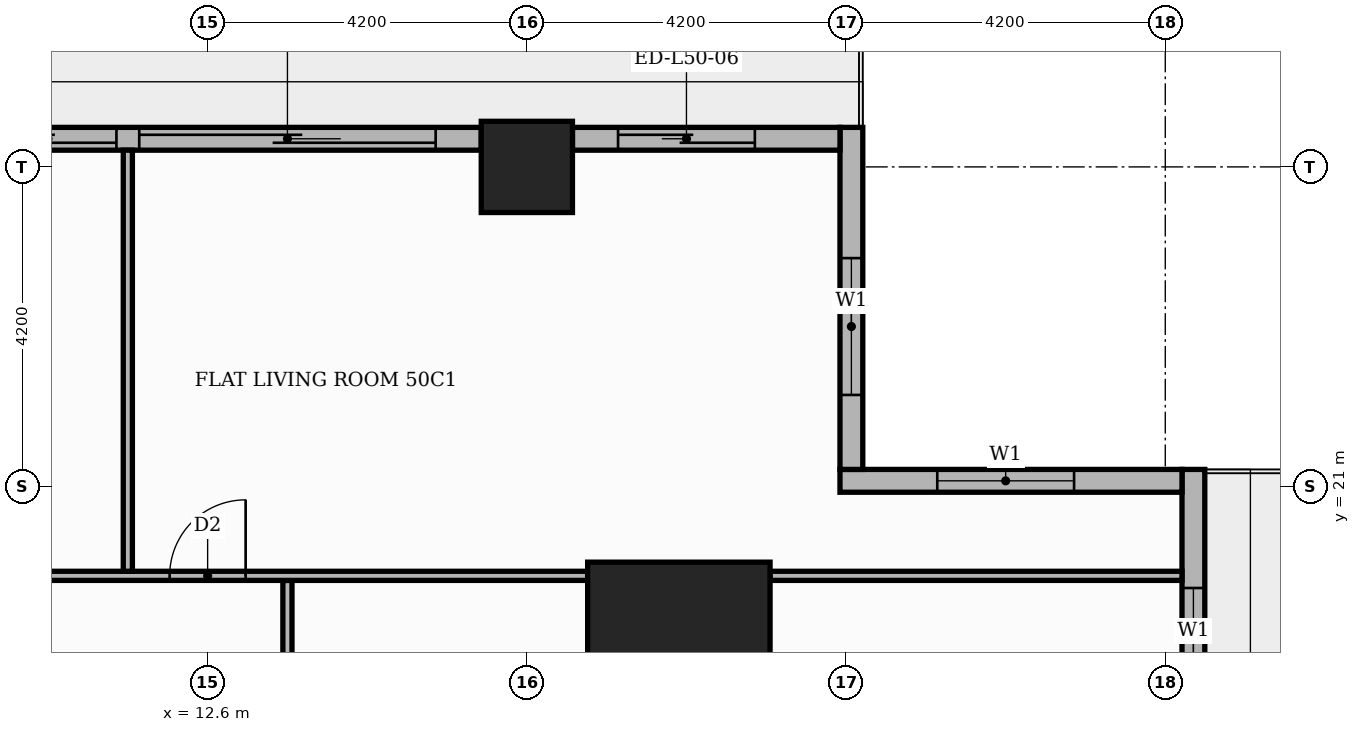
"""IFC4 building model, lengths in metres.
Left out: names, types, materials, properties, quantities, classifications, styles, units other than length and angle.
Written with IfcOpenShell. Run it as: python <this file> out.ifc"""

import sys

from ifc_helpers import new_model, si_unit, direction, frame, frame_2d, origin, origin_2d, place, context, subcontext, project, spatial, rectangle, extrude, element, fill, save


model = new_model("IFC4")
c1 = context("Model", 3, precision=1e-05, world=origin(), true_north=direction((0.0, 1.0)))
c2 = subcontext(c1, "Body", "Model", "MODEL_VIEW")
j1 = project(units=[si_unit("LENGTHUNIT", "METRE"), si_unit("PLANEANGLEUNIT", "RADIAN")], contexts=[c1])
p1 = place(None, origin())
s1 = spatial("IfcSite", under=j1, at=p1, CompositionType="ELEMENT")
p2 = place(p1, origin())
s2 = spatial("IfcBuilding", under=s1, at=p2, CompositionType="ELEMENT")
p3 = place(p2, frame((0.0, 0.0, 211.8)))
s3 = spatial("IfcBuildingStorey", under=s2, at=p3, CompositionType="ELEMENT", Elevation=211.8)
p4 = place(p3, frame((18.8, 18.8, 0.0), z_axis=(0.0, 0.0, 1.0), x_axis=(1.0, 0.0, 0.0)))
e1 = element("IfcColumn", 1, at=p4, inside=s3, PredefinedType="COLUMN", context=c2, shape_type="SweptSolid", body=[
    extrude(rectangle(XDim=2.4, YDim=2.4, at=origin_2d()), origin(), (0.0, 0.0, 1.0), 3.9),
])
p5 = place(p3, frame((16.8, 25.2, 0.0), z_axis=(0.0, 0.0, 1.0), x_axis=(1.0, 0.0, 0.0)))
e2 = element("IfcColumn", 2, at=p5, inside=s3, PredefinedType="COLUMN", context=c2, shape_type="SweptSolid", body=[
    extrude(rectangle(XDim=1.2, YDim=1.2, at=origin_2d()), origin(), (0.0, 0.0, 1.0), 3.9),
])
p6 = place(p3, frame((25.57, 17.4, 0.0), z_axis=(0.0, 0.0, 1.0), x_axis=(0.0, 1.0, 0.0)))
e3 = element("IfcWall", 3, at=p6, inside=s3, PredefinedType="STANDARD", context=c2, shape_type="SweptSolid", body=[
    extrude(rectangle(XDim=3.82, YDim=0.3, at=frame_2d((1.91, 0.0))), origin(), (0.0, 0.0, 1.0), 3.48),
])
p7 = place(p6, frame((0.46, 0.0, 0.9)))
e4 = element("IfcOpeningElement", 4, at=p7, cuts=e3, PredefinedType="OPENING", context=c2, shape_type="SweptSolid", body=[
    extrude(rectangle(XDim=1.8, YDim=2.1, at=frame_2d((0.9, 1.05))), frame((0.0, 0.16, 0.0), z_axis=(0.0, -1.0, 0.0), x_axis=(1.0, 0.0, 0.0)), (0.0, 0.0, 1.0), 0.32),
])
p8 = place(p3, frame((25.42, 21.07, 0.0), z_axis=(0.0, 0.0, 1.0), x_axis=(-1.0, 0.0, 0.0)))
e5 = element("IfcWall", 5, at=p8, inside=s3, PredefinedType="STANDARD", context=c2, shape_type="SweptSolid", body=[
    extrude(rectangle(XDim=4.5, YDim=0.3, at=frame_2d((2.25, 0.0))), origin(), (0.0, 0.0, 1.0), 3.48),
])
p9 = place(p8, frame((1.42, 0.0, 0.9)))
e6 = element("IfcOpeningElement", 6, at=p9, cuts=e5, PredefinedType="OPENING", context=c2, shape_type="SweptSolid", body=[
    extrude(rectangle(XDim=1.8, YDim=2.1, at=frame_2d((0.9, 1.05))), frame((0.0, 0.16, 0.0), z_axis=(0.0, -1.0, 0.0), x_axis=(1.0, 0.0, 0.0)), (0.0, 0.0, 1.0), 0.32),
])
p10 = place(p3, frame((21.07, 21.22, 0.0), z_axis=(0.0, 0.0, 1.0), x_axis=(0.0, 1.0, 0.0)))
e7 = element("IfcWall", 7, at=p10, inside=s3, PredefinedType="STANDARD", context=c2, shape_type="SweptSolid", body=[
    extrude(rectangle(XDim=4.5, YDim=0.3, at=frame_2d((2.25, 0.0))), origin(), (0.0, 0.0, 1.0), 3.48),
])
p11 = place(p10, frame((0.98, 0.0, 0.9)))
e8 = element("IfcOpeningElement", 8, at=p11, cuts=e7, PredefinedType="OPENING", context=c2, shape_type="SweptSolid", body=[
    extrude(rectangle(XDim=1.8, YDim=2.1, at=frame_2d((0.9, 1.05))), frame((0.0, 0.16, 0.0), z_axis=(0.0, -1.0, 0.0), x_axis=(1.0, 0.0, 0.0)), (0.0, 0.0, 1.0), 0.32),
])
p12 = place(p3, frame((20.92, 25.57, 0.0), z_axis=(0.0, 0.0, 1.0), x_axis=(-1.0, 0.0, 0.0)))
e9 = element("IfcWall", 9, at=p12, inside=s3, PredefinedType="STANDARD", context=c2, shape_type="SweptSolid", body=[
    extrude(rectangle(XDim=3.52, YDim=0.3, at=frame_2d((1.76, 0.0))), origin(), (0.0, 0.0, 1.0), 3.48),
])
p13 = place(p12, frame((1.12, 0.0, 0.0)))
e10 = element("IfcOpeningElement", 10, at=p13, cuts=e9, PredefinedType="OPENING", context=c2, shape_type="SweptSolid", body=[
    extrude(rectangle(XDim=1.8, YDim=2.4, at=frame_2d((0.9, 1.2))), frame((0.0, 0.16, 0.0), z_axis=(0.0, -1.0, 0.0), x_axis=(1.0, 0.0, 0.0)), (0.0, 0.0, 1.0), 0.32),
])
p14 = place(p3, frame((16.2, 25.57, 0.0), z_axis=(0.0, 0.0, 1.0), x_axis=(-1.0, 0.0, 0.0)))
e11 = element("IfcWall", 11, at=p14, inside=s3, PredefinedType="STANDARD", context=c2, shape_type="SweptSolid", body=[
    extrude(rectangle(XDim=7.2, YDim=0.3, at=frame_2d((3.6, 0.0))), origin(), (0.0, 0.0, 1.0), 3.48),
])
p15 = place(p14, frame((0.6, 0.0, 0.0)))
e12 = element("IfcOpeningElement", 12, at=p15, cuts=e11, PredefinedType="OPENING", context=c2, shape_type="SweptSolid", body=[
    extrude(rectangle(XDim=3.9, YDim=2.4, at=frame_2d((1.95, 1.2))), frame((0.0, 0.16, 0.0), z_axis=(0.0, -1.0, 0.0), x_axis=(1.0, 0.0, 0.0)), (0.0, 0.0, 1.0), 0.32),
])
p16 = place(p14, frame((4.8, 0.0, 0.0)))
e13 = element("IfcOpeningElement", 13, at=p16, cuts=e11, PredefinedType="OPENING", context=c2, shape_type="SweptSolid", body=[
    extrude(rectangle(XDim=1.8, YDim=2.4, at=frame_2d((0.9, 1.2))), frame((0.0, 0.16, 0.0), z_axis=(0.0, -1.0, 0.0), x_axis=(1.0, 0.0, 0.0)), (0.0, 0.0, 1.0), 0.32),
])
p17 = place(p3, frame((13.65, 13.75, 0.0), z_axis=(0.0, 0.0, 1.0), x_axis=(0.0, 1.0, 0.0)))
e14 = element("IfcWall", 14, at=p17, inside=s3, PredefinedType="PARTITIONING", context=c2, shape_type="SweptSolid", body=[
    extrude(rectangle(XDim=6.01, YDim=0.12, at=frame_2d((3.005, 0.0))), origin(), (0.0, 0.0, 1.0), 3.48),
])
p18 = place(p17, frame((2.535, 0.0, 0.0)))
e15 = element("IfcOpeningElement", 15, at=p18, cuts=e14, PredefinedType="OPENING", context=c2, shape_type="SweptSolid", body=[
    extrude(rectangle(XDim=0.9, YDim=2.1, at=frame_2d((0.45, 1.05))), frame((0.0, 0.07, 0.0), z_axis=(0.0, -1.0, 0.0), x_axis=(1.0, 0.0, 0.0)), (0.0, 0.0, 1.0), 0.14),
])
p19 = place(p3, frame((-13.55, 19.82, 0.0), z_axis=(0.0, 0.0, 1.0), x_axis=(1.0, 0.0, 0.0)))
e16 = element("IfcWall", 16, at=p19, inside=s3, PredefinedType="PARTITIONING", context=c2, shape_type="SweptSolid", body=[
    extrude(rectangle(XDim=31.15, YDim=0.12, at=frame_2d((15.575, 0.0))), origin(), (0.0, 0.0, 1.0), 3.48),
])
p20 = place(p19, frame((25.65, 0.0, 0.0)))
e17 = element("IfcOpeningElement", 17, at=p20, cuts=e16, PredefinedType="OPENING", context=c2, shape_type="SweptSolid", body=[
    extrude(rectangle(XDim=1.0, YDim=2.1, at=frame_2d((0.5, 1.05))), frame((0.0, 0.07, 0.0), z_axis=(0.0, -1.0, 0.0), x_axis=(1.0, 0.0, 0.0)), (0.0, 0.0, 1.0), 0.14),
])
p21 = place(p19, frame((20.4, 0.0, 0.0)))
e18 = element("IfcOpeningElement", 18, at=p21, cuts=e16, PredefinedType="OPENING", context=c2, shape_type="SweptSolid", body=[
    extrude(rectangle(XDim=1.0, YDim=2.1, at=frame_2d((0.5, 1.05))), frame((0.0, 0.07, 0.0), z_axis=(0.0, -1.0, 0.0), x_axis=(1.0, 0.0, 0.0)), (0.0, 0.0, 1.0), 0.14),
])
p22 = place(p19, frame((13.1, 0.0, 0.0)))
e19 = element("IfcOpeningElement", 19, at=p22, cuts=e16, PredefinedType="OPENING", context=c2, shape_type="SweptSolid", body=[
    extrude(rectangle(XDim=0.9, YDim=2.1, at=frame_2d((0.45, 1.05))), frame((0.0, 0.07, 0.0), z_axis=(0.0, -1.0, 0.0), x_axis=(1.0, 0.0, 0.0)), (0.0, 0.0, 1.0), 0.14),
])
p23 = place(p19, frame((3.65, 0.0, 0.0)))
e20 = element("IfcOpeningElement", 20, at=p23, cuts=e16, PredefinedType="OPENING", context=c2, shape_type="SweptSolid", body=[
    extrude(rectangle(XDim=0.9, YDim=2.1, at=frame_2d((0.45, 1.05))), frame((0.0, 0.07, 0.0), z_axis=(0.0, -1.0, 0.0), x_axis=(1.0, 0.0, 0.0)), (0.0, 0.0, 1.0), 0.14),
])
p24 = place(p3, frame((20.0, 19.82, 0.0), z_axis=(0.0, 0.0, 1.0), x_axis=(1.0, 0.0, 0.0)))
e21 = element("IfcWall", 21, at=p24, inside=s3, PredefinedType="PARTITIONING", context=c2, shape_type="SweptSolid", body=[
    extrude(rectangle(XDim=5.42, YDim=0.12, at=frame_2d((2.71, 0.0))), origin(), (0.0, 0.0, 1.0), 3.48),
])
p25 = place(p3, frame((11.55, 19.88, 0.0), z_axis=(0.0, 0.0, 1.0), x_axis=(0.0, 1.0, 0.0)))
e22 = element("IfcWall", 22, at=p25, inside=s3, PredefinedType="PARTITIONING", context=c2, shape_type="SweptSolid", body=[
    extrude(rectangle(XDim=5.54, YDim=0.12, at=frame_2d((2.77, 0.0))), origin(), (0.0, 0.0, 1.0), 3.48),
])
p26 = place(p7, origin())
e23 = element("IfcWindow", 23, at=p26, inside=s3, PartitioningType="SINGLE_PANEL", PredefinedType="WINDOW", context=c2, shape_type="SweptSolid", body=[
    extrude(rectangle(XDim=1.8, YDim=2.1, at=frame_2d((0.9, 1.05))), frame((0.0, 0.03, 0.0), z_axis=(0.0, -1.0, 0.0), x_axis=(1.0, 0.0, 0.0)), (0.0, 0.0, 1.0), 0.06),
])
fill(e4, e23)
p27 = place(p9, origin())
e24 = element("IfcWindow", 24, at=p27, inside=s3, PartitioningType="SINGLE_PANEL", PredefinedType="WINDOW", context=c2, shape_type="SweptSolid", body=[
    extrude(rectangle(XDim=1.8, YDim=2.1, at=frame_2d((0.9, 1.05))), frame((0.0, 0.03, 0.0), z_axis=(0.0, -1.0, 0.0), x_axis=(1.0, 0.0, 0.0)), (0.0, 0.0, 1.0), 0.06),
])
fill(e6, e24)
p28 = place(p11, origin())
e25 = element("IfcWindow", 25, at=p28, inside=s3, PartitioningType="SINGLE_PANEL", PredefinedType="WINDOW", context=c2, shape_type="SweptSolid", body=[
    extrude(rectangle(XDim=1.8, YDim=2.1, at=frame_2d((0.9, 1.05))), frame((0.0, 0.03, 0.0), z_axis=(0.0, -1.0, 0.0), x_axis=(1.0, 0.0, 0.0)), (0.0, 0.0, 1.0), 0.06),
])
fill(e8, e25)
p29 = place(p13, origin())
e26 = element("IfcDoor", 26, at=p29, inside=s3, OperationType="SLIDING_TO_RIGHT", PredefinedType="DOOR", context=c2, shape_type="SweptSolid", body=[
    extrude(rectangle(XDim=1.8, YDim=2.4, at=frame_2d((0.9, 1.2))), frame((0.0, 0.025, 0.0), z_axis=(0.0, -1.0, 0.0), x_axis=(1.0, 0.0, 0.0)), (0.0, 0.0, 1.0), 0.05),
])
fill(e10, e26)
p30 = place(p15, origin())
e27 = element("IfcDoor", 27, at=p30, inside=s3, OperationType="SLIDING_TO_LEFT", PredefinedType="DOOR", context=c2, shape_type="SweptSolid", body=[
    extrude(rectangle(XDim=3.9, YDim=2.4, at=frame_2d((1.95, 1.2))), frame((0.0, 0.025, 0.0), z_axis=(0.0, -1.0, 0.0), x_axis=(1.0, 0.0, 0.0)), (0.0, 0.0, 1.0), 0.05),
])
fill(e12, e27)
p31 = place(p16, origin())
e28 = element("IfcDoor", 28, at=p31, inside=s3, OperationType="SLIDING_TO_RIGHT", PredefinedType="DOOR", context=c2, shape_type="SweptSolid", body=[
    extrude(rectangle(XDim=1.8, YDim=2.4, at=frame_2d((0.9, 1.2))), frame((0.0, 0.025, 0.0), z_axis=(0.0, -1.0, 0.0), x_axis=(1.0, 0.0, 0.0)), (0.0, 0.0, 1.0), 0.05),
])
fill(e13, e28)
p32 = place(p20, origin())
e29 = element("IfcDoor", 29, at=p32, inside=s3, OperationType="SINGLE_SWING_RIGHT", PredefinedType="DOOR", context=c2, shape_type="SweptSolid", body=[
    extrude(rectangle(XDim=1.0, YDim=2.1, at=frame_2d((0.5, 1.05))), frame((0.0, 0.025, 0.0), z_axis=(0.0, -1.0, 0.0), x_axis=(1.0, 0.0, 0.0)), (0.0, 0.0, 1.0), 0.05),
])
fill(e17, e29)
save(model, sys.argv[1])
